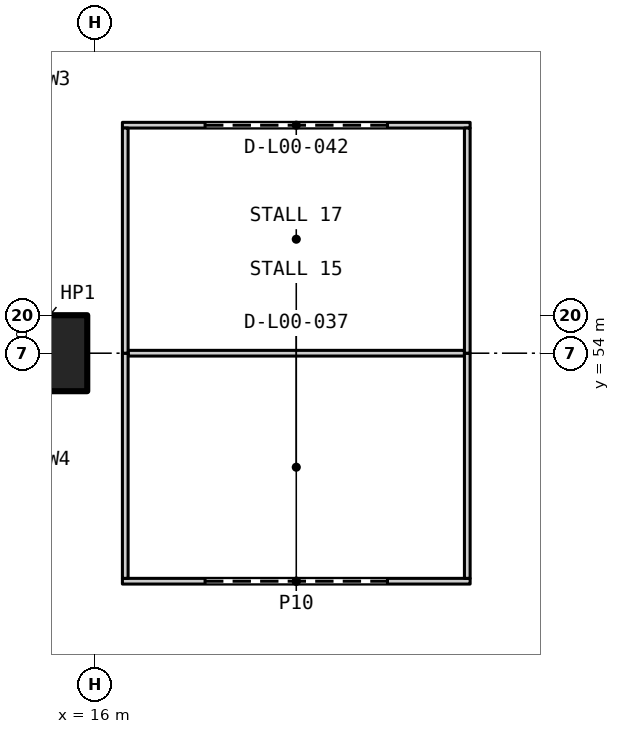
"""IFC4 building model, lengths in metres.
Left out: names, types, materials, properties, quantities, classifications, styles, units other than length and angle.
Written with IfcOpenShell. Run it as: python <this file> out.ifc"""

import sys

from ifc_helpers import new_model, si_unit, direction, frame, frame_2d, origin, origin_2d, place, context, subcontext, project, spatial, rectangle, extrude, element, fill, save


model = new_model("IFC4")
c1 = context("Model", 3, precision=1e-05, world=origin(), true_north=direction((0.0, 1.0)))
c2 = subcontext(c1, "Body", "Model", "MODEL_VIEW")
j1 = project(units=[si_unit("LENGTHUNIT", "METRE"), si_unit("PLANEANGLEUNIT", "RADIAN")], contexts=[c1])
p1 = place(None, origin())
s1 = spatial("IfcSite", under=j1, at=p1, CompositionType="ELEMENT")
p2 = place(p1, origin())
s2 = spatial("IfcBuilding", under=s1, at=p2, CompositionType="ELEMENT")
p3 = place(p2, origin())
s3 = spatial("IfcBuildingStorey", under=s2, at=p3, CompositionType="ELEMENT", Elevation=0.0)
p4 = place(p3, frame((15.0, 54.0, 0.0), z_axis=(0.0, 0.0, 1.0), x_axis=(1.0, 0.0, 0.0)))
e1 = element("IfcColumn", 1, at=p4, inside=s3, PredefinedType="COLUMN", context=c2, shape_type="SweptSolid", body=[
    extrude(rectangle(XDim=1.8, YDim=1.0, at=origin_2d()), origin(), (0.0, 0.0, 1.0), 6.0),
])
p5 = place(p3, frame((16.363, 51.0, 0.0), z_axis=(0.0, 0.0, 1.0), x_axis=(1.0, 0.0, 0.0)))
e2 = element("IfcWall", 2, at=p5, inside=s3, PredefinedType="PARTITIONING", context=c2, shape_type="SweptSolid", body=[
    extrude(rectangle(XDim=4.575, YDim=0.075, at=frame_2d((2.288, 0.0))), origin(), (0.0, 0.0, 1.0), 3.0),
])
p6 = place(p5, frame((1.087, 0.0, 0.0)))
e3 = element("IfcOpeningElement", 3, at=p6, cuts=e2, PredefinedType="OPENING", context=c2, shape_type="SweptSolid", body=[
    extrude(rectangle(XDim=2.4, YDim=2.4, at=frame_2d((1.2, 1.2))), frame((0.0, 0.047, 0.0), z_axis=(0.0, -1.0, 0.0), x_axis=(1.0, 0.0, 0.0)), (0.0, 0.0, 1.0), 0.095),
])
p7 = place(p3, frame((16.438, 54.0, 0.0), z_axis=(0.0, 0.0, 1.0), x_axis=(1.0, 0.0, 0.0)))
e4 = element("IfcWall", 4, at=p7, inside=s3, PredefinedType="PARTITIONING", context=c2, shape_type="SweptSolid", body=[
    extrude(rectangle(XDim=4.425, YDim=0.075, at=frame_2d((2.212, 0.0))), origin(), (0.0, 0.0, 1.0), 3.0),
])
p8 = place(p3, frame((16.363, 57.0, 0.0), z_axis=(0.0, 0.0, 1.0), x_axis=(1.0, 0.0, 0.0)))
e5 = element("IfcWall", 5, at=p8, inside=s3, PredefinedType="PARTITIONING", context=c2, shape_type="SweptSolid", body=[
    extrude(rectangle(XDim=4.575, YDim=0.075, at=frame_2d((2.288, 0.0))), origin(), (0.0, 0.0, 1.0), 3.0),
])
p9 = place(p8, frame((1.087, 0.0, 0.0)))
e6 = element("IfcOpeningElement", 6, at=p9, cuts=e5, PredefinedType="OPENING", context=c2, shape_type="SweptSolid", body=[
    extrude(rectangle(XDim=2.4, YDim=2.4, at=frame_2d((1.2, 1.2))), frame((0.0, 0.047, 0.0), z_axis=(0.0, -1.0, 0.0), x_axis=(1.0, 0.0, 0.0)), (0.0, 0.0, 1.0), 0.095),
])
for number, where, z_axis, x_axis in (
    (7, (16.4, 51.038, 0.0), (0.0, 0.0, 1.0), (0.0, 1.0, 0.0)),
    (8, (16.4, 54.0, 0.0), (0.0, 0.0, 1.0), (0.0, 1.0, 0.0)),
    (9, (20.9, 51.038, 0.0), (0.0, 0.0, 1.0), (0.0, 1.0, 0.0)),
    (10, (20.9, 54.0, 0.0), (0.0, 0.0, 1.0), (0.0, 1.0, 0.0)),
):
    element("IfcWall", number, at=place(p3, frame(where, z_axis=z_axis, x_axis=x_axis)), inside=s3, PredefinedType="PARTITIONING", context=c2, shape_type="SweptSolid", body=[
        extrude(rectangle(XDim=2.962, YDim=0.075, at=frame_2d((1.481, 0.0))), origin(), (0.0, 0.0, 1.0), 3.0),
    ])
p10 = place(p6, origin())
e11 = element("IfcDoor", 11, at=p10, inside=s3, OperationType="ROLLINGUP", PredefinedType="DOOR", context=c2, shape_type="SweptSolid", body=[
    extrude(rectangle(XDim=2.4, YDim=2.4, at=frame_2d((1.2, 1.2))), frame((0.0, 0.025, 0.0), z_axis=(0.0, -1.0, 0.0), x_axis=(1.0, 0.0, 0.0)), (0.0, 0.0, 1.0), 0.05),
])
fill(e3, e11)
p11 = place(p9, origin())
e12 = element("IfcDoor", 12, at=p11, inside=s3, OperationType="ROLLINGUP", PredefinedType="DOOR", context=c2, shape_type="SweptSolid", body=[
    extrude(rectangle(XDim=2.4, YDim=2.4, at=frame_2d((1.2, 1.2))), frame((0.0, 0.025, 0.0), z_axis=(0.0, -1.0, 0.0), x_axis=(1.0, 0.0, 0.0)), (0.0, 0.0, 1.0), 0.05),
])
fill(e6, e12)
save(model, sys.argv[1])
